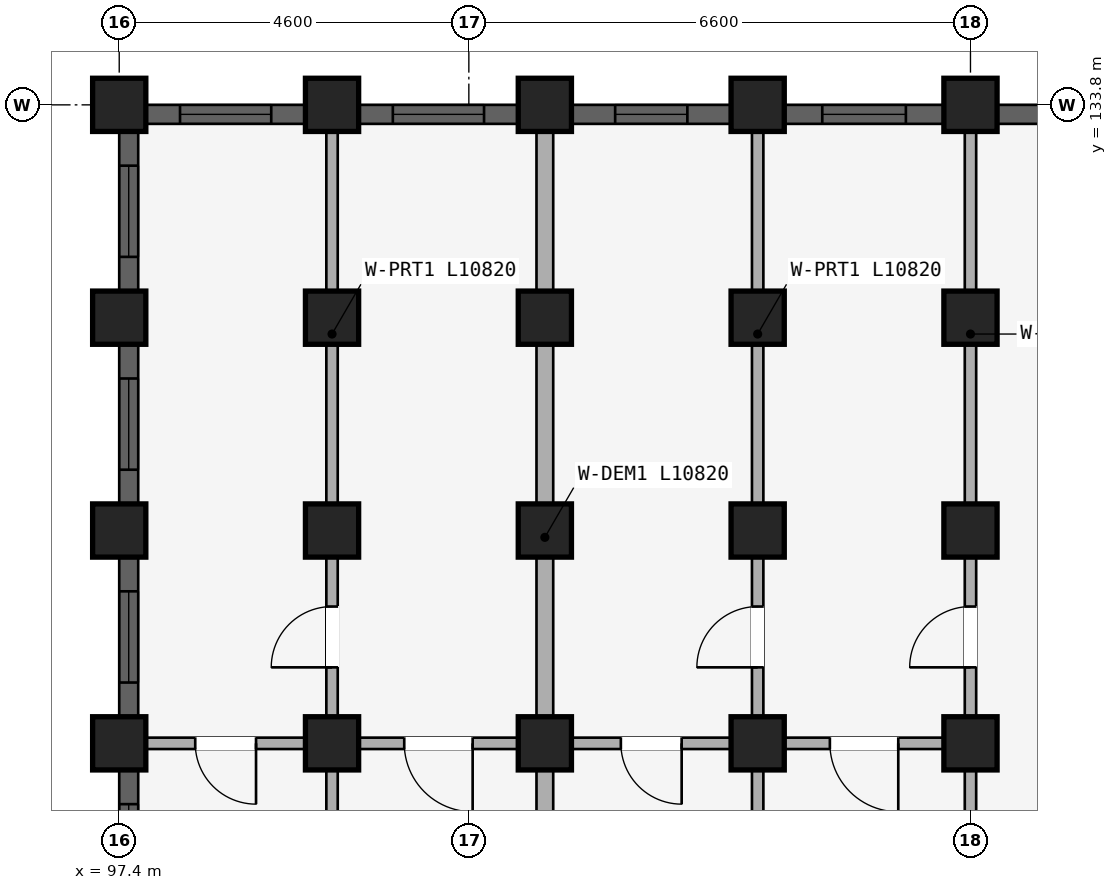
"""IFC4 building model, lengths in metres.
Left out: names, types, materials, properties, quantities, classifications, styles, units other than length and angle.
Written with IfcOpenShell. Run it as: python <this file> out.ifc"""

import sys

from ifc_helpers import new_model, si_unit, direction, frame, frame_2d, origin, origin_2d, place, context, subcontext, project, spatial, rectangle, extrude, element, fill, save


model = new_model("IFC4")
c1 = context("Model", 3, precision=1e-05, world=origin(), true_north=direction((0.0, 1.0)))
c2 = subcontext(c1, "Body", "Model", "MODEL_VIEW")
j1 = project(units=[si_unit("LENGTHUNIT", "METRE"), si_unit("PLANEANGLEUNIT", "RADIAN")], contexts=[c1])
p1 = place(None, origin())
s1 = spatial("IfcSite", under=j1, at=p1, CompositionType="ELEMENT")
p2 = place(p1, origin())
s2 = spatial("IfcBuilding", under=s1, at=p2, CompositionType="ELEMENT")
p3 = place(p2, frame((0.0, 0.0, 24.45)))
s3 = spatial("IfcBuildingStorey", under=s2, at=p3, CompositionType="ELEMENT", Elevation=24.45)
for number, where, z_axis, x_axis in (
    (1, (108.6, 125.4, 0.0), (0.0, 0.0, 1.0), (1.0, 0.0, 0.0)),
    (2, (108.6, 128.2, 0.0), (0.0, 0.0, 1.0), (1.0, 0.0, 0.0)),
    (3, (108.6, 131.0, 0.0), (0.0, 0.0, 1.0), (1.0, 0.0, 0.0)),
    (4, (108.6, 133.8, 0.0), (0.0, 0.0, 1.0), (1.0, 0.0, 0.0)),
    (5, (105.8, 125.4, 0.0), (0.0, 0.0, 1.0), (1.0, 0.0, 0.0)),
    (6, (105.8, 128.2, 0.0), (0.0, 0.0, 1.0), (1.0, 0.0, 0.0)),
    (7, (105.8, 131.0, 0.0), (0.0, 0.0, 1.0), (1.0, 0.0, 0.0)),
    (8, (105.8, 133.8, 0.0), (0.0, 0.0, 1.0), (1.0, 0.0, 0.0)),
    (9, (103.0, 125.4, 0.0), (0.0, 0.0, 1.0), (1.0, 0.0, 0.0)),
    (10, (103.0, 128.2, 0.0), (0.0, 0.0, 1.0), (1.0, 0.0, 0.0)),
    (11, (103.0, 131.0, 0.0), (0.0, 0.0, 1.0), (1.0, 0.0, 0.0)),
    (12, (103.0, 133.8, 0.0), (0.0, 0.0, 1.0), (1.0, 0.0, 0.0)),
    (13, (100.2, 125.4, 0.0), (0.0, 0.0, 1.0), (1.0, 0.0, 0.0)),
    (14, (100.2, 128.2, 0.0), (0.0, 0.0, 1.0), (1.0, 0.0, 0.0)),
    (15, (100.2, 131.0, 0.0), (0.0, 0.0, 1.0), (1.0, 0.0, 0.0)),
    (16, (100.2, 133.8, 0.0), (0.0, 0.0, 1.0), (1.0, 0.0, 0.0)),
    (17, (97.4, 125.4, 0.0), (0.0, 0.0, 1.0), (1.0, 0.0, 0.0)),
    (18, (97.4, 128.2, 0.0), (0.0, 0.0, 1.0), (1.0, 0.0, 0.0)),
    (19, (97.4, 131.0, 0.0), (0.0, 0.0, 1.0), (1.0, 0.0, 0.0)),
    (20, (97.4, 133.8, 0.0), (0.0, 0.0, 1.0), (1.0, 0.0, 0.0)),
):
    element("IfcColumn", number, at=place(p3, frame(where, z_axis=z_axis, x_axis=x_axis)), inside=s3, PredefinedType="COLUMN", context=c2, shape_type="SweptSolid", body=[
        extrude(rectangle(XDim=0.7, YDim=0.7, at=origin_2d()), origin(), (0.0, 0.0, 1.0), 2.93),
    ])
p4 = place(p3, frame((108.52, 125.4, 0.0), z_axis=(0.0, 0.0, 1.0), x_axis=(-1.0, 0.0, 0.0)))
e21 = element("IfcWall", 21, at=p4, inside=s3, PredefinedType="PLUMBINGWALL", context=c2, shape_type="SweptSolid", body=[
    extrude(rectangle(XDim=2.64, YDim=0.15, at=frame_2d((1.32, 0.0))), origin(), (0.0, 0.0, 1.0), 2.372),
])
p5 = place(p4, frame((0.87, 0.0, 0.0)))
e22 = element("IfcOpeningElement", 22, at=p5, cuts=e21, PredefinedType="OPENING", context=c2, shape_type="SweptSolid", body=[
    extrude(rectangle(XDim=0.9, YDim=2.1, at=frame_2d((0.45, 1.05))), frame((0.0, 0.085, 0.0), z_axis=(0.0, -1.0, 0.0), x_axis=(1.0, 0.0, 0.0)), (0.0, 0.0, 1.0), 0.17),
])
p6 = place(p3, frame((105.72, 125.4, 0.0), z_axis=(0.0, 0.0, 1.0), x_axis=(-1.0, 0.0, 0.0)))
e23 = element("IfcWall", 23, at=p6, inside=s3, PredefinedType="PLUMBINGWALL", context=c2, shape_type="SweptSolid", body=[
    extrude(rectangle(XDim=2.64, YDim=0.15, at=frame_2d((1.32, 0.0))), origin(), (0.0, 0.0, 1.0), 2.372),
])
p7 = place(p6, frame((0.92, 0.0, 0.0)))
e24 = element("IfcOpeningElement", 24, at=p7, cuts=e23, PredefinedType="OPENING", context=c2, shape_type="SweptSolid", body=[
    extrude(rectangle(XDim=0.8, YDim=2.1, at=frame_2d((0.4, 1.05))), frame((0.0, 0.085, 0.0), z_axis=(0.0, -1.0, 0.0), x_axis=(1.0, 0.0, 0.0)), (0.0, 0.0, 1.0), 0.17),
])
p8 = place(p3, frame((102.92, 125.4, 0.0), z_axis=(0.0, 0.0, 1.0), x_axis=(-1.0, 0.0, 0.0)))
e25 = element("IfcWall", 25, at=p8, inside=s3, PredefinedType="PLUMBINGWALL", context=c2, shape_type="SweptSolid", body=[
    extrude(rectangle(XDim=2.64, YDim=0.15, at=frame_2d((1.32, 0.0))), origin(), (0.0, 0.0, 1.0), 2.372),
])
p9 = place(p8, frame((0.87, 0.0, 0.0)))
e26 = element("IfcOpeningElement", 26, at=p9, cuts=e25, PredefinedType="OPENING", context=c2, shape_type="SweptSolid", body=[
    extrude(rectangle(XDim=0.9, YDim=2.1, at=frame_2d((0.45, 1.05))), frame((0.0, 0.085, 0.0), z_axis=(0.0, -1.0, 0.0), x_axis=(1.0, 0.0, 0.0)), (0.0, 0.0, 1.0), 0.17),
])
p10 = place(p3, frame((100.12, 125.4, 0.0), z_axis=(0.0, 0.0, 1.0), x_axis=(-1.0, 0.0, 0.0)))
e27 = element("IfcWall", 27, at=p10, inside=s3, PredefinedType="PLUMBINGWALL", context=c2, shape_type="SweptSolid", body=[
    extrude(rectangle(XDim=2.64, YDim=0.15, at=frame_2d((1.32, 0.0))), origin(), (0.0, 0.0, 1.0), 2.372),
])
p11 = place(p10, frame((0.92, 0.0, 0.0)))
e28 = element("IfcOpeningElement", 28, at=p11, cuts=e27, PredefinedType="OPENING", context=c2, shape_type="SweptSolid", body=[
    extrude(rectangle(XDim=0.8, YDim=2.1, at=frame_2d((0.4, 1.05))), frame((0.0, 0.085, 0.0), z_axis=(0.0, -1.0, 0.0), x_axis=(1.0, 0.0, 0.0)), (0.0, 0.0, 1.0), 0.17),
])
p12 = place(p3, frame((108.6, 122.7, 0.0), z_axis=(0.0, 0.0, 1.0), x_axis=(0.0, 1.0, 0.0)))
e29 = element("IfcWall", 29, at=p12, inside=s3, PredefinedType="PARTITIONING", context=c2, shape_type="SweptSolid", body=[
    extrude(rectangle(XDim=10.82, YDim=0.15, at=frame_2d((5.41, 0.0))), origin(), (0.0, 0.0, 1.0), 2.372),
])
p13 = place(p12, frame((3.7, 0.0, 0.0)))
e30 = element("IfcOpeningElement", 30, at=p13, cuts=e29, PredefinedType="OPENING", context=c2, shape_type="SweptSolid", body=[
    extrude(rectangle(XDim=0.8, YDim=2.1, at=frame_2d((0.4, 1.05))), frame((0.0, 0.085, 0.0), z_axis=(0.0, -1.0, 0.0), x_axis=(1.0, 0.0, 0.0)), (0.0, 0.0, 1.0), 0.17),
])
p14 = place(p3, frame((105.8, 122.7, 0.0), z_axis=(0.0, 0.0, 1.0), x_axis=(0.0, 1.0, 0.0)))
e31 = element("IfcWall", 31, at=p14, inside=s3, PredefinedType="PARTITIONING", context=c2, shape_type="SweptSolid", body=[
    extrude(rectangle(XDim=10.82, YDim=0.15, at=frame_2d((5.41, 0.0))), origin(), (0.0, 0.0, 1.0), 2.372),
])
p15 = place(p14, frame((3.7, 0.0, 0.0)))
e32 = element("IfcOpeningElement", 32, at=p15, cuts=e31, PredefinedType="OPENING", context=c2, shape_type="SweptSolid", body=[
    extrude(rectangle(XDim=0.8, YDim=2.1, at=frame_2d((0.4, 1.05))), frame((0.0, 0.085, 0.0), z_axis=(0.0, -1.0, 0.0), x_axis=(1.0, 0.0, 0.0)), (0.0, 0.0, 1.0), 0.17),
])
p16 = place(p3, frame((103.0, 122.7, 0.0), z_axis=(0.0, 0.0, 1.0), x_axis=(0.0, 1.0, 0.0)))
e33 = element("IfcWall", 33, at=p16, inside=s3, PredefinedType="STANDARD", context=c2, shape_type="SweptSolid", body=[
    extrude(rectangle(XDim=10.82, YDim=0.22, at=frame_2d((5.41, 0.0))), origin(), (0.0, 0.0, 1.0), 2.372),
])
p17 = place(p3, frame((100.2, 122.7, 0.0), z_axis=(0.0, 0.0, 1.0), x_axis=(0.0, 1.0, 0.0)))
e34 = element("IfcWall", 34, at=p17, inside=s3, PredefinedType="PARTITIONING", context=c2, shape_type="SweptSolid", body=[
    extrude(rectangle(XDim=10.82, YDim=0.15, at=frame_2d((5.41, 0.0))), origin(), (0.0, 0.0, 1.0), 2.372),
])
p18 = place(p17, frame((3.7, 0.0, 0.0)))
e35 = element("IfcOpeningElement", 35, at=p18, cuts=e34, PredefinedType="OPENING", context=c2, shape_type="SweptSolid", body=[
    extrude(rectangle(XDim=0.8, YDim=2.1, at=frame_2d((0.4, 1.05))), frame((0.0, 0.085, 0.0), z_axis=(0.0, -1.0, 0.0), x_axis=(1.0, 0.0, 0.0)), (0.0, 0.0, 1.0), 0.17),
])
p19 = place(p3, frame((113.846, 133.675, 0.0), z_axis=(0.0, 0.0, 1.0), x_axis=(-1.0, 0.0, 0.0)))
e36 = element("IfcWall", 36, at=p19, inside=s3, PredefinedType="STANDARD", context=c2, shape_type="SweptSolid", body=[
    extrude(rectangle(XDim=4.893, YDim=0.25, at=frame_2d((2.446, 0.0))), origin(), (0.0, 0.0, 1.0), 2.472),
])
p20 = place(p19, frame((1.846, 0.0, 0.772)))
e37 = element("IfcOpeningElement", 37, at=p20, cuts=e36, PredefinedType="OPENING", context=c2, shape_type="SweptSolid", body=[
    extrude(rectangle(XDim=1.2, YDim=1.5, at=frame_2d((0.6, 0.75))), frame((0.0, 0.135, 0.0), z_axis=(0.0, -1.0, 0.0), x_axis=(1.0, 0.0, 0.0)), (0.0, 0.0, 1.0), 0.27),
])
p21 = place(p3, frame((108.247, 133.675, 0.0), z_axis=(0.0, 0.0, 1.0), x_axis=(-1.0, 0.0, 0.0)))
e38 = element("IfcWall", 38, at=p21, inside=s3, PredefinedType="STANDARD", context=c2, shape_type="SweptSolid", body=[
    extrude(rectangle(XDim=2.093, YDim=0.25, at=frame_2d((1.046, 0.0))), origin(), (0.0, 0.0, 1.0), 2.472),
])
p22 = place(p21, frame((0.497, 0.0, 0.822)))
e39 = element("IfcOpeningElement", 39, at=p22, cuts=e38, PredefinedType="OPENING", context=c2, shape_type="SweptSolid", body=[
    extrude(rectangle(XDim=1.1, YDim=1.45, at=frame_2d((0.55, 0.725))), frame((0.0, 0.135, 0.0), z_axis=(0.0, -1.0, 0.0), x_axis=(1.0, 0.0, 0.0)), (0.0, 0.0, 1.0), 0.27),
])
p23 = place(p3, frame((105.447, 133.675, 0.0), z_axis=(0.0, 0.0, 1.0), x_axis=(-1.0, 0.0, 0.0)))
e40 = element("IfcWall", 40, at=p23, inside=s3, PredefinedType="STANDARD", context=c2, shape_type="SweptSolid", body=[
    extrude(rectangle(XDim=2.093, YDim=0.25, at=frame_2d((1.046, 0.0))), origin(), (0.0, 0.0, 1.0), 2.472),
])
p24 = place(p23, frame((0.572, 0.0, 0.88)))
e41 = element("IfcOpeningElement", 41, at=p24, cuts=e40, PredefinedType="OPENING", context=c2, shape_type="SweptSolid", body=[
    extrude(rectangle(XDim=0.95, YDim=1.35, at=frame_2d((0.475, 0.675))), frame((0.0, 0.135, 0.0), z_axis=(0.0, -1.0, 0.0), x_axis=(1.0, 0.0, 0.0)), (0.0, 0.0, 1.0), 0.27),
])
p25 = place(p3, frame((102.646, 133.675, 0.0), z_axis=(0.0, 0.0, 1.0), x_axis=(-1.0, 0.0, 0.0)))
e42 = element("IfcWall", 42, at=p25, inside=s3, PredefinedType="STANDARD", context=c2, shape_type="SweptSolid", body=[
    extrude(rectangle(XDim=2.093, YDim=0.25, at=frame_2d((1.046, 0.0))), origin(), (0.0, 0.0, 1.0), 2.472),
])
p26 = place(p25, frame((0.447, 0.0, 0.772)))
e43 = element("IfcOpeningElement", 43, at=p26, cuts=e42, PredefinedType="OPENING", context=c2, shape_type="SweptSolid", body=[
    extrude(rectangle(XDim=1.2, YDim=1.5, at=frame_2d((0.6, 0.75))), frame((0.0, 0.135, 0.0), z_axis=(0.0, -1.0, 0.0), x_axis=(1.0, 0.0, 0.0)), (0.0, 0.0, 1.0), 0.27),
])
p27 = place(p3, frame((99.846, 133.675, 0.0), z_axis=(0.0, 0.0, 1.0), x_axis=(-1.0, 0.0, 0.0)))
e44 = element("IfcWall", 44, at=p27, inside=s3, PredefinedType="STANDARD", context=c2, shape_type="SweptSolid", body=[
    extrude(rectangle(XDim=2.093, YDim=0.25, at=frame_2d((1.046, 0.0))), origin(), (0.0, 0.0, 1.0), 2.472),
])
p28 = place(p27, frame((0.447, 0.0, 0.772)))
e45 = element("IfcOpeningElement", 45, at=p28, cuts=e44, PredefinedType="OPENING", context=c2, shape_type="SweptSolid", body=[
    extrude(rectangle(XDim=1.2, YDim=1.5, at=frame_2d((0.6, 0.75))), frame((0.0, 0.135, 0.0), z_axis=(0.0, -1.0, 0.0), x_axis=(1.0, 0.0, 0.0)), (0.0, 0.0, 1.0), 0.27),
])
p29 = place(p3, frame((97.525, 122.954, 0.0), z_axis=(0.0, 0.0, 1.0), x_axis=(0.0, 1.0, 0.0)))
e46 = element("IfcWall", 46, at=p29, inside=s3, PredefinedType="STANDARD", context=c2, shape_type="SweptSolid", body=[
    extrude(rectangle(XDim=2.093, YDim=0.25, at=frame_2d((1.046, 0.0))), origin(), (0.0, 0.0, 1.0), 2.372),
])
p30 = place(p29, frame((0.447, 0.0, 0.672)))
e47 = element("IfcOpeningElement", 47, at=p30, cuts=e46, PredefinedType="OPENING", context=c2, shape_type="SweptSolid", body=[
    extrude(rectangle(XDim=1.2, YDim=1.5, at=frame_2d((0.6, 0.75))), frame((0.0, 0.135, 0.0), z_axis=(0.0, -1.0, 0.0), x_axis=(1.0, 0.0, 0.0)), (0.0, 0.0, 1.0), 0.27),
])
p31 = place(p3, frame((97.525, 125.753, 0.0), z_axis=(0.0, 0.0, 1.0), x_axis=(0.0, 1.0, 0.0)))
e48 = element("IfcWall", 48, at=p31, inside=s3, PredefinedType="STANDARD", context=c2, shape_type="SweptSolid", body=[
    extrude(rectangle(XDim=2.093, YDim=0.25, at=frame_2d((1.046, 0.0))), origin(), (0.0, 0.0, 1.0), 2.372),
])
p32 = place(p31, frame((0.447, 0.0, 0.672)))
e49 = element("IfcOpeningElement", 49, at=p32, cuts=e48, PredefinedType="OPENING", context=c2, shape_type="SweptSolid", body=[
    extrude(rectangle(XDim=1.2, YDim=1.5, at=frame_2d((0.6, 0.75))), frame((0.0, 0.135, 0.0), z_axis=(0.0, -1.0, 0.0), x_axis=(1.0, 0.0, 0.0)), (0.0, 0.0, 1.0), 0.27),
])
p33 = place(p3, frame((97.525, 128.553, 0.0), z_axis=(0.0, 0.0, 1.0), x_axis=(0.0, 1.0, 0.0)))
e50 = element("IfcWall", 50, at=p33, inside=s3, PredefinedType="STANDARD", context=c2, shape_type="SweptSolid", body=[
    extrude(rectangle(XDim=2.093, YDim=0.25, at=frame_2d((1.046, 0.0))), origin(), (0.0, 0.0, 1.0), 2.372),
])
p34 = place(p33, frame((0.447, 0.0, 0.672)))
e51 = element("IfcOpeningElement", 51, at=p34, cuts=e50, PredefinedType="OPENING", context=c2, shape_type="SweptSolid", body=[
    extrude(rectangle(XDim=1.2, YDim=1.5, at=frame_2d((0.6, 0.75))), frame((0.0, 0.135, 0.0), z_axis=(0.0, -1.0, 0.0), x_axis=(1.0, 0.0, 0.0)), (0.0, 0.0, 1.0), 0.27),
])
p35 = place(p3, frame((97.525, 131.354, 0.0), z_axis=(0.0, 0.0, 1.0), x_axis=(0.0, 1.0, 0.0)))
e52 = element("IfcWall", 52, at=p35, inside=s3, PredefinedType="STANDARD", context=c2, shape_type="SweptSolid", body=[
    extrude(rectangle(XDim=2.093, YDim=0.25, at=frame_2d((1.046, 0.0))), origin(), (0.0, 0.0, 1.0), 2.372),
])
p36 = place(p35, frame((0.447, 0.0, 0.672)))
e53 = element("IfcOpeningElement", 53, at=p36, cuts=e52, PredefinedType="OPENING", context=c2, shape_type="SweptSolid", body=[
    extrude(rectangle(XDim=1.2, YDim=1.5, at=frame_2d((0.6, 0.75))), frame((0.0, 0.135, 0.0), z_axis=(0.0, -1.0, 0.0), x_axis=(1.0, 0.0, 0.0)), (0.0, 0.0, 1.0), 0.27),
])
p37 = place(p22, origin())
e54 = element("IfcWindow", 54, at=p37, inside=s3, PartitioningType="SINGLE_PANEL", PredefinedType="WINDOW", context=c2, shape_type="SweptSolid", body=[
    extrude(rectangle(XDim=1.1, YDim=1.45, at=frame_2d((0.55, 0.725))), frame((0.0, 0.03, 0.0), z_axis=(0.0, -1.0, 0.0), x_axis=(1.0, 0.0, 0.0)), (0.0, 0.0, 1.0), 0.06),
])
fill(e39, e54)
p38 = place(p24, origin())
e55 = element("IfcWindow", 55, at=p38, inside=s3, PartitioningType="SINGLE_PANEL", PredefinedType="WINDOW", context=c2, shape_type="SweptSolid", body=[
    extrude(rectangle(XDim=0.95, YDim=1.35, at=frame_2d((0.475, 0.675))), frame((0.0, 0.03, 0.0), z_axis=(0.0, -1.0, 0.0), x_axis=(1.0, 0.0, 0.0)), (0.0, 0.0, 1.0), 0.06),
])
fill(e41, e55)
p39 = place(p26, origin())
e56 = element("IfcWindow", 56, at=p39, inside=s3, PartitioningType="SINGLE_PANEL", PredefinedType="WINDOW", context=c2, shape_type="SweptSolid", body=[
    extrude(rectangle(XDim=1.2, YDim=1.5, at=frame_2d((0.6, 0.75))), frame((0.0, 0.03, 0.0), z_axis=(0.0, -1.0, 0.0), x_axis=(1.0, 0.0, 0.0)), (0.0, 0.0, 1.0), 0.06),
])
fill(e43, e56)
p40 = place(p28, origin())
e57 = element("IfcWindow", 57, at=p40, inside=s3, PartitioningType="SINGLE_PANEL", PredefinedType="WINDOW", context=c2, shape_type="SweptSolid", body=[
    extrude(rectangle(XDim=1.2, YDim=1.5, at=frame_2d((0.6, 0.75))), frame((0.0, 0.03, 0.0), z_axis=(0.0, -1.0, 0.0), x_axis=(1.0, 0.0, 0.0)), (0.0, 0.0, 1.0), 0.06),
])
fill(e45, e57)
p41 = place(p30, origin())
e58 = element("IfcWindow", 58, at=p41, inside=s3, PartitioningType="SINGLE_PANEL", PredefinedType="WINDOW", context=c2, shape_type="SweptSolid", body=[
    extrude(rectangle(XDim=1.2, YDim=1.5, at=frame_2d((0.6, 0.75))), frame((0.0, 0.03, 0.0), z_axis=(0.0, -1.0, 0.0), x_axis=(1.0, 0.0, 0.0)), (0.0, 0.0, 1.0), 0.06),
])
fill(e47, e58)
p42 = place(p32, origin())
e59 = element("IfcWindow", 59, at=p42, inside=s3, PartitioningType="SINGLE_PANEL", PredefinedType="WINDOW", context=c2, shape_type="SweptSolid", body=[
    extrude(rectangle(XDim=1.2, YDim=1.5, at=frame_2d((0.6, 0.75))), frame((0.0, 0.03, 0.0), z_axis=(0.0, -1.0, 0.0), x_axis=(1.0, 0.0, 0.0)), (0.0, 0.0, 1.0), 0.06),
])
fill(e49, e59)
p43 = place(p34, origin())
e60 = element("IfcWindow", 60, at=p43, inside=s3, PartitioningType="SINGLE_PANEL", PredefinedType="WINDOW", context=c2, shape_type="SweptSolid", body=[
    extrude(rectangle(XDim=1.2, YDim=1.5, at=frame_2d((0.6, 0.75))), frame((0.0, 0.03, 0.0), z_axis=(0.0, -1.0, 0.0), x_axis=(1.0, 0.0, 0.0)), (0.0, 0.0, 1.0), 0.06),
])
fill(e51, e60)
p44 = place(p36, origin())
e61 = element("IfcWindow", 61, at=p44, inside=s3, PartitioningType="SINGLE_PANEL", PredefinedType="WINDOW", context=c2, shape_type="SweptSolid", body=[
    extrude(rectangle(XDim=1.2, YDim=1.5, at=frame_2d((0.6, 0.75))), frame((0.0, 0.03, 0.0), z_axis=(0.0, -1.0, 0.0), x_axis=(1.0, 0.0, 0.0)), (0.0, 0.0, 1.0), 0.06),
])
fill(e53, e61)
p45 = place(p5, origin())
e62 = element("IfcDoor", 62, at=p45, inside=s3, OperationType="SINGLE_SWING_LEFT", PredefinedType="DOOR", context=c2, shape_type="SweptSolid", body=[
    extrude(rectangle(XDim=0.9, YDim=2.1, at=frame_2d((0.45, 1.05))), frame((0.0, 0.025, 0.0), z_axis=(0.0, -1.0, 0.0), x_axis=(1.0, 0.0, 0.0)), (0.0, 0.0, 1.0), 0.05),
])
fill(e22, e62)
p46 = place(p7, origin())
e63 = element("IfcDoor", 63, at=p46, inside=s3, OperationType="SINGLE_SWING_LEFT", PredefinedType="DOOR", context=c2, shape_type="SweptSolid", body=[
    extrude(rectangle(XDim=0.8, YDim=2.1, at=frame_2d((0.4, 1.05))), frame((0.0, 0.025, 0.0), z_axis=(0.0, -1.0, 0.0), x_axis=(1.0, 0.0, 0.0)), (0.0, 0.0, 1.0), 0.05),
])
fill(e24, e63)
p47 = place(p9, origin())
e64 = element("IfcDoor", 64, at=p47, inside=s3, OperationType="SINGLE_SWING_LEFT", PredefinedType="DOOR", context=c2, shape_type="SweptSolid", body=[
    extrude(rectangle(XDim=0.9, YDim=2.1, at=frame_2d((0.45, 1.05))), frame((0.0, 0.025, 0.0), z_axis=(0.0, -1.0, 0.0), x_axis=(1.0, 0.0, 0.0)), (0.0, 0.0, 1.0), 0.05),
])
fill(e26, e64)
p48 = place(p11, origin())
e65 = element("IfcDoor", 65, at=p48, inside=s3, OperationType="SINGLE_SWING_LEFT", PredefinedType="DOOR", context=c2, shape_type="SweptSolid", body=[
    extrude(rectangle(XDim=0.8, YDim=2.1, at=frame_2d((0.4, 1.05))), frame((0.0, 0.025, 0.0), z_axis=(0.0, -1.0, 0.0), x_axis=(1.0, 0.0, 0.0)), (0.0, 0.0, 1.0), 0.05),
])
fill(e28, e65)
p49 = place(p13, frame((0.8, 0.0, 0.0), z_axis=(0.0, 0.0, 1.0), x_axis=(-1.0, 0.0, 0.0)))
e66 = element("IfcDoor", 66, at=p49, inside=s3, OperationType="SINGLE_SWING_RIGHT", PredefinedType="DOOR", context=c2, shape_type="SweptSolid", body=[
    extrude(rectangle(XDim=0.8, YDim=2.1, at=frame_2d((0.4, 1.05))), frame((0.0, 0.025, 0.0), z_axis=(0.0, -1.0, 0.0), x_axis=(1.0, 0.0, 0.0)), (0.0, 0.0, 1.0), 0.05),
])
fill(e30, e66)
p50 = place(p15, origin())
e67 = element("IfcDoor", 67, at=p50, inside=s3, OperationType="SINGLE_SWING_LEFT", PredefinedType="DOOR", context=c2, shape_type="SweptSolid", body=[
    extrude(rectangle(XDim=0.8, YDim=2.1, at=frame_2d((0.4, 1.05))), frame((0.0, 0.025, 0.0), z_axis=(0.0, -1.0, 0.0), x_axis=(1.0, 0.0, 0.0)), (0.0, 0.0, 1.0), 0.05),
])
fill(e32, e67)
p51 = place(p18, frame((0.8, 0.0, 0.0), z_axis=(0.0, 0.0, 1.0), x_axis=(-1.0, 0.0, 0.0)))
e68 = element("IfcDoor", 68, at=p51, inside=s3, OperationType="SINGLE_SWING_RIGHT", PredefinedType="DOOR", context=c2, shape_type="SweptSolid", body=[
    extrude(rectangle(XDim=0.8, YDim=2.1, at=frame_2d((0.4, 1.05))), frame((0.0, 0.025, 0.0), z_axis=(0.0, -1.0, 0.0), x_axis=(1.0, 0.0, 0.0)), (0.0, 0.0, 1.0), 0.05),
])
fill(e35, e68)
save(model, sys.argv[1])
